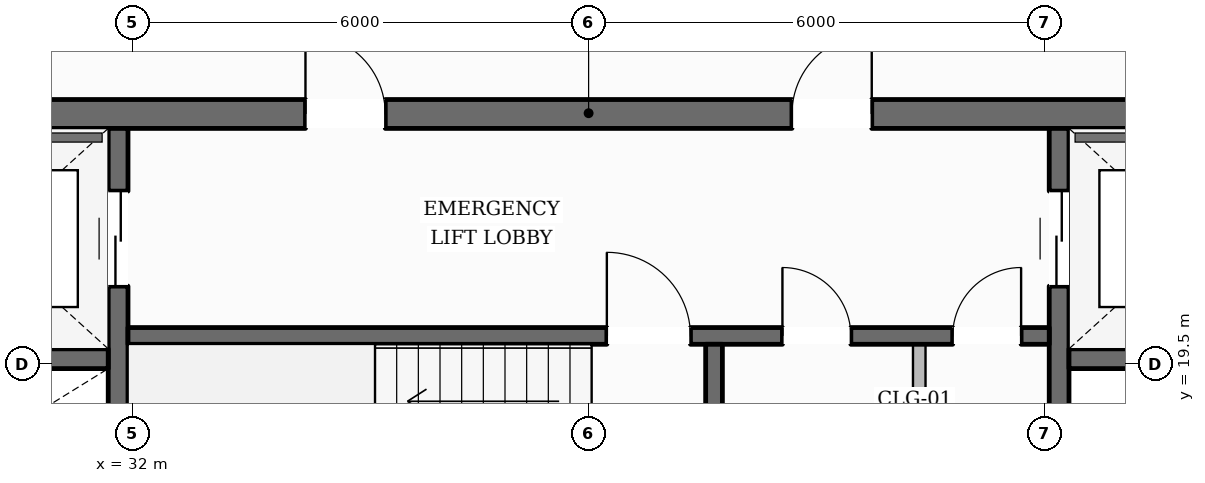
"""IFC4 building model, lengths in metres.
Left out: names, types, materials, properties, quantities, classifications, styles, units other than length and angle.
Written with IfcOpenShell. Run it as: python <this file> out.ifc"""

import sys

from ifc_helpers import new_model, si_unit, direction, frame, frame_2d, origin, place, context, subcontext, project, spatial, rectangle, extrude, element, fill, save


model = new_model("IFC4")
c1 = context("Model", 3, precision=1e-05, world=origin(), true_north=direction((0.0, 1.0)))
c2 = subcontext(c1, "Body", "Model", "MODEL_VIEW")
j1 = project(units=[si_unit("LENGTHUNIT", "METRE"), si_unit("PLANEANGLEUNIT", "RADIAN")], contexts=[c1])
p1 = place(None, origin())
s1 = spatial("IfcSite", under=j1, at=p1, CompositionType="ELEMENT")
p2 = place(p1, origin())
s2 = spatial("IfcBuilding", under=s1, at=p2, CompositionType="ELEMENT")
p3 = place(p2, frame((0.0, 0.0, 285.7)))
s3 = spatial("IfcBuildingStorey", under=s2, at=p3, CompositionType="ELEMENT", Elevation=285.7)
p4 = place(p3, frame((28.1, 22.79, 0.0), z_axis=(0.0, 0.0, 1.0), x_axis=(1.0, 0.0, 0.0)))
e1 = element("IfcWall", 1, at=p4, inside=s3, PredefinedType="SOLIDWALL", context=c2, shape_type="SweptSolid", body=[
    extrude(rectangle(XDim=19.8, YDim=0.38, at=frame_2d((9.9, 0.0))), origin(), (0.0, 0.0, 1.0), 3.61),
])
p5 = place(p4, frame((6.175, 0.0, 0.0)))
e2 = element("IfcOpeningElement", 2, at=p5, cuts=e1, PredefinedType="OPENING", context=c2, shape_type="SweptSolid", body=[
    extrude(rectangle(XDim=1.05, YDim=2.15, at=frame_2d((0.525, 1.075))), frame((0.0, 0.2, 0.0), z_axis=(0.0, -1.0, 0.0), x_axis=(1.0, 0.0, 0.0)), (0.0, 0.0, 1.0), 0.4),
])
p6 = place(p4, frame((12.575, 0.0, 0.0)))
e3 = element("IfcOpeningElement", 3, at=p6, cuts=e1, PredefinedType="OPENING", context=c2, shape_type="SweptSolid", body=[
    extrude(rectangle(XDim=1.05, YDim=2.15, at=frame_2d((0.525, 1.075))), frame((0.0, 0.2, 0.0), z_axis=(0.0, -1.0, 0.0), x_axis=(1.0, 0.0, 0.0)), (0.0, 0.0, 1.0), 0.4),
])
p7 = place(p3, frame((31.81, 9.6, 0.0), z_axis=(0.0, 0.0, 1.0), x_axis=(0.0, 1.0, 0.0)))
e4 = element("IfcWall", 4, at=p7, inside=s3, PredefinedType="SHEAR", context=c2, shape_type="SweptSolid", body=[
    extrude(rectangle(XDim=13.0, YDim=0.26, at=frame_2d((6.5, 0.0))), origin(), (0.0, 0.0, 1.0), 3.61),
])
p8 = place(p7, frame((10.925, 0.0, 0.0)))
e5 = element("IfcOpeningElement", 5, at=p8, cuts=e4, PredefinedType="OPENING", context=c2, shape_type="SweptSolid", body=[
    extrude(rectangle(XDim=1.25, YDim=2.25, at=frame_2d((0.625, 1.125))), frame((0.0, 0.14, 0.0), z_axis=(0.0, -1.0, 0.0), x_axis=(1.0, 0.0, 0.0)), (0.0, 0.0, 1.0), 0.28),
])
p9 = place(p3, frame((44.19, 9.6, 0.0), z_axis=(0.0, 0.0, 1.0), x_axis=(0.0, 1.0, 0.0)))
e6 = element("IfcWall", 6, at=p9, inside=s3, PredefinedType="SHEAR", context=c2, shape_type="SweptSolid", body=[
    extrude(rectangle(XDim=13.0, YDim=0.26, at=frame_2d((6.5, 0.0))), origin(), (0.0, 0.0, 1.0), 3.61),
])
p10 = place(p9, frame((10.925, 0.0, 0.0)))
e7 = element("IfcOpeningElement", 7, at=p10, cuts=e6, PredefinedType="OPENING", context=c2, shape_type="SweptSolid", body=[
    extrude(rectangle(XDim=1.25, YDim=2.25, at=frame_2d((0.625, 1.125))), frame((0.0, 0.14, 0.0), z_axis=(0.0, -1.0, 0.0), x_axis=(1.0, 0.0, 0.0)), (0.0, 0.0, 1.0), 0.28),
])
for number, where, z_axis, x_axis in (
    (8, (28.48, 19.57, 0.0), (0.0, 0.0, 1.0), (1.0, 0.0, 0.0)),
    (9, (44.32, 19.57, 0.0), (0.0, 0.0, 1.0), (1.0, 0.0, 0.0)),
):
    element("IfcWall", number, at=place(p3, frame(where, z_axis=z_axis, x_axis=x_axis)), inside=s3, PredefinedType="SHEAR", context=c2, shape_type="SweptSolid", body=[
        extrude(rectangle(XDim=3.2, YDim=0.26, at=frame_2d((1.6, 0.0))), origin(), (0.0, 0.0, 1.0), 3.61),
    ])
p11 = place(p3, frame((31.94, 19.87, 0.0), z_axis=(0.0, 0.0, 1.0), x_axis=(1.0, 0.0, 0.0)))
e10 = element("IfcWall", 10, at=p11, inside=s3, PredefinedType="SOLIDWALL", context=c2, shape_type="SweptSolid", body=[
    extrude(rectangle(XDim=12.12, YDim=0.22, at=frame_2d((6.06, 0.0))), origin(), (0.0, 0.0, 1.0), 3.61),
])
p12 = place(p11, frame((6.3, 0.0, 0.0)))
e11 = element("IfcOpeningElement", 11, at=p12, cuts=e10, PredefinedType="OPENING", context=c2, shape_type="SweptSolid", body=[
    extrude(rectangle(XDim=1.1, YDim=2.15, at=frame_2d((0.55, 1.075))), frame((0.0, 0.12, 0.0), z_axis=(0.0, -1.0, 0.0), x_axis=(1.0, 0.0, 0.0)), (0.0, 0.0, 1.0), 0.24),
])
p13 = place(p11, frame((8.61, 0.0, 0.0)))
e12 = element("IfcOpeningElement", 12, at=p13, cuts=e10, PredefinedType="OPENING", context=c2, shape_type="SweptSolid", body=[
    extrude(rectangle(XDim=0.9, YDim=2.1, at=frame_2d((0.45, 1.05))), frame((0.0, 0.12, 0.0), z_axis=(0.0, -1.0, 0.0), x_axis=(1.0, 0.0, 0.0)), (0.0, 0.0, 1.0), 0.24),
])
p14 = place(p11, frame((10.85, 0.0, 0.0)))
e13 = element("IfcOpeningElement", 13, at=p14, cuts=e10, PredefinedType="OPENING", context=c2, shape_type="SweptSolid", body=[
    extrude(rectangle(XDim=0.9, YDim=2.1, at=frame_2d((0.45, 1.05))), frame((0.0, 0.12, 0.0), z_axis=(0.0, -1.0, 0.0), x_axis=(1.0, 0.0, 0.0)), (0.0, 0.0, 1.0), 0.24),
])
p15 = place(p3, frame((39.65, 16.56, 0.0), z_axis=(0.0, 0.0, 1.0), x_axis=(0.0, 1.0, 0.0)))
e14 = element("IfcWall", 14, at=p15, inside=s3, PredefinedType="SOLIDWALL", context=c2, shape_type="SweptSolid", body=[
    extrude(rectangle(XDim=3.2, YDim=0.22, at=frame_2d((1.6, 0.0))), origin(), (0.0, 0.0, 1.0), 3.61),
])
p16 = place(p3, frame((15.195, 10.019, 0.0), z_axis=(0.0, 0.0, 1.0), x_axis=(0.508088294866, 0.861304989316, 0.0)))
e15 = element("IfcWall", 15, at=p16, inside=s3, PredefinedType="STANDARD", context=c2, shape_type="SweptSolid", body=[
    extrude(rectangle(XDim=39.26, YDim=0.35, at=frame_2d((19.63, 0.0))), origin(), (0.0, 0.0, 1.0), 3.196),
])
p17 = place(p16, frame((28.845, 0.0, 0.0)))
e16 = element("IfcOpeningElement", 16, at=p17, cuts=e15, PredefinedType="OPENING", context=c2, shape_type="SweptSolid", body=[
    extrude(rectangle(XDim=1.0, YDim=2.2, at=frame_2d((0.5, 1.1))), frame((0.0, 0.185, 0.0), z_axis=(0.0, -1.0, 0.0), x_axis=(1.0, 0.0, 0.0)), (0.0, 0.0, 1.0), 0.37),
])
p18 = place(p16, frame((34.922, 0.0, 0.65)))
e17 = element("IfcOpeningElement", 17, at=p18, cuts=e15, PredefinedType="OPENING", context=c2, shape_type="SweptSolid", body=[
    extrude(rectangle(XDim=1.35, YDim=1.75, at=frame_2d((0.675, 0.875))), frame((0.0, 0.185, 0.0), z_axis=(0.0, -1.0, 0.0), x_axis=(1.0, 0.0, 0.0)), (0.0, 0.0, 1.0), 0.37),
])
p19 = place(p16, frame((22.152, 0.0, 0.65)))
e18 = element("IfcOpeningElement", 18, at=p19, cuts=e15, PredefinedType="OPENING", context=c2, shape_type="SweptSolid", body=[
    extrude(rectangle(XDim=1.35, YDim=1.75, at=frame_2d((0.675, 0.875))), frame((0.0, 0.185, 0.0), z_axis=(0.0, -1.0, 0.0), x_axis=(1.0, 0.0, 0.0)), (0.0, 0.0, 1.0), 0.37),
])
p20 = place(p16, frame((9.382, 0.0, 0.65)))
e19 = element("IfcOpeningElement", 19, at=p20, cuts=e15, PredefinedType="OPENING", context=c2, shape_type="SweptSolid", body=[
    extrude(rectangle(XDim=1.35, YDim=1.75, at=frame_2d((0.675, 0.875))), frame((0.0, 0.185, 0.0), z_axis=(0.0, -1.0, 0.0), x_axis=(1.0, 0.0, 0.0)), (0.0, 0.0, 1.0), 0.37),
])
p21 = place(p16, frame((2.997, 0.0, 0.65)))
e20 = element("IfcOpeningElement", 20, at=p21, cuts=e15, PredefinedType="OPENING", context=c2, shape_type="SweptSolid", body=[
    extrude(rectangle(XDim=1.35, YDim=1.75, at=frame_2d((0.675, 0.875))), frame((0.0, 0.185, 0.0), z_axis=(0.0, -1.0, 0.0), x_axis=(1.0, 0.0, 0.0)), (0.0, 0.0, 1.0), 0.37),
])
p22 = place(p3, frame((40.742, 43.905, 0.0), z_axis=(0.0, 0.0, 1.0), x_axis=(0.49863744838, -0.866810645454, 0.0)))
e21 = element("IfcWall", 21, at=p22, inside=s3, PredefinedType="STANDARD", context=c2, shape_type="SweptSolid", body=[
    extrude(rectangle(XDim=38.525, YDim=0.35, at=frame_2d((19.262, 0.0))), origin(), (0.0, 0.0, 1.0), 3.196),
])
p23 = place(p22, frame((34.24, 0.0, 0.65)))
e22 = element("IfcOpeningElement", 22, at=p23, cuts=e21, PredefinedType="OPENING", context=c2, shape_type="SweptSolid", body=[
    extrude(rectangle(XDim=1.35, YDim=1.75, at=frame_2d((0.675, 0.875))), frame((0.0, 0.185, 0.0), z_axis=(0.0, -1.0, 0.0), x_axis=(1.0, 0.0, 0.0)), (0.0, 0.0, 1.0), 0.37),
])
p24 = place(p22, frame((27.979, 0.0, 0.65)))
e23 = element("IfcOpeningElement", 23, at=p24, cuts=e21, PredefinedType="OPENING", context=c2, shape_type="SweptSolid", body=[
    extrude(rectangle(XDim=1.35, YDim=1.75, at=frame_2d((0.675, 0.875))), frame((0.0, 0.185, 0.0), z_axis=(0.0, -1.0, 0.0), x_axis=(1.0, 0.0, 0.0)), (0.0, 0.0, 1.0), 0.37),
])
p25 = place(p22, frame((21.719, 0.0, 0.65)))
e24 = element("IfcOpeningElement", 24, at=p25, cuts=e21, PredefinedType="OPENING", context=c2, shape_type="SweptSolid", body=[
    extrude(rectangle(XDim=1.35, YDim=1.75, at=frame_2d((0.675, 0.875))), frame((0.0, 0.185, 0.0), z_axis=(0.0, -1.0, 0.0), x_axis=(1.0, 0.0, 0.0)), (0.0, 0.0, 1.0), 0.37),
])
p26 = place(p22, frame((9.197, 0.0, 0.65)))
e25 = element("IfcOpeningElement", 25, at=p26, cuts=e21, PredefinedType="OPENING", context=c2, shape_type="SweptSolid", body=[
    extrude(rectangle(XDim=1.35, YDim=1.75, at=frame_2d((0.675, 0.875))), frame((0.0, 0.185, 0.0), z_axis=(0.0, -1.0, 0.0), x_axis=(1.0, 0.0, 0.0)), (0.0, 0.0, 1.0), 0.37),
])
p27 = place(p22, frame((2.936, 0.0, 0.65)))
e26 = element("IfcOpeningElement", 26, at=p27, cuts=e21, PredefinedType="OPENING", context=c2, shape_type="SweptSolid", body=[
    extrude(rectangle(XDim=1.35, YDim=1.75, at=frame_2d((0.675, 0.875))), frame((0.0, 0.185, 0.0), z_axis=(0.0, -1.0, 0.0), x_axis=(1.0, 0.0, 0.0)), (0.0, 0.0, 1.0), 0.37),
])
p28 = place(p3, frame((42.35, 16.56, 0.0), z_axis=(0.0, 0.0, 1.0), x_axis=(0.0, 1.0, 0.0)))
e27 = element("IfcWall", 27, at=p28, inside=s3, PredefinedType="PARTITIONING", context=c2, shape_type="SweptSolid", body=[
    extrude(rectangle(XDim=3.2, YDim=0.165, at=frame_2d((1.6, 0.0))), origin(), (0.0, 0.0, 1.0), 3.61),
])
p29 = place(p12, origin())
e28 = element("IfcDoor", 28, at=p29, inside=s3, OperationType="SINGLE_SWING_LEFT", PredefinedType="DOOR", context=c2, shape_type="SweptSolid", body=[
    extrude(rectangle(XDim=1.1, YDim=2.15, at=frame_2d((0.55, 1.075))), frame((0.0, 0.025, 0.0), z_axis=(0.0, -1.0, 0.0), x_axis=(1.0, 0.0, 0.0)), (0.0, 0.0, 1.0), 0.05),
])
fill(e11, e28)
p30 = place(p5, origin())
e29 = element("IfcDoor", 29, at=p30, inside=s3, OperationType="SINGLE_SWING_LEFT", PredefinedType="DOOR", context=c2, shape_type="SweptSolid", body=[
    extrude(rectangle(XDim=1.05, YDim=2.15, at=frame_2d((0.525, 1.075))), frame((0.0, 0.025, 0.0), z_axis=(0.0, -1.0, 0.0), x_axis=(1.0, 0.0, 0.0)), (0.0, 0.0, 1.0), 0.05),
])
fill(e2, e29)
p31 = place(p6, origin())
e30 = element("IfcDoor", 30, at=p31, inside=s3, OperationType="SINGLE_SWING_RIGHT", PredefinedType="DOOR", context=c2, shape_type="SweptSolid", body=[
    extrude(rectangle(XDim=1.05, YDim=2.15, at=frame_2d((0.525, 1.075))), frame((0.0, 0.025, 0.0), z_axis=(0.0, -1.0, 0.0), x_axis=(1.0, 0.0, 0.0)), (0.0, 0.0, 1.0), 0.05),
])
fill(e3, e30)
p32 = place(p8, origin())
e31 = element("IfcDoor", 31, at=p32, inside=s3, OperationType="DOUBLE_DOOR_SLIDING", PredefinedType="DOOR", context=c2, shape_type="SweptSolid", body=[
    extrude(rectangle(XDim=1.25, YDim=2.25, at=frame_2d((0.625, 1.125))), frame((0.0, 0.025, 0.0), z_axis=(0.0, -1.0, 0.0), x_axis=(1.0, 0.0, 0.0)), (0.0, 0.0, 1.0), 0.05),
])
fill(e5, e31)
p33 = place(p10, origin())
e32 = element("IfcDoor", 32, at=p33, inside=s3, OperationType="DOUBLE_DOOR_SLIDING", PredefinedType="DOOR", context=c2, shape_type="SweptSolid", body=[
    extrude(rectangle(XDim=1.25, YDim=2.25, at=frame_2d((0.625, 1.125))), frame((0.0, 0.025, 0.0), z_axis=(0.0, -1.0, 0.0), x_axis=(1.0, 0.0, 0.0)), (0.0, 0.0, 1.0), 0.05),
])
fill(e7, e32)
p34 = place(p13, origin())
e33 = element("IfcDoor", 33, at=p34, inside=s3, OperationType="SINGLE_SWING_LEFT", PredefinedType="DOOR", context=c2, shape_type="SweptSolid", body=[
    extrude(rectangle(XDim=0.9, YDim=2.1, at=frame_2d((0.45, 1.05))), frame((0.0, 0.025, 0.0), z_axis=(0.0, -1.0, 0.0), x_axis=(1.0, 0.0, 0.0)), (0.0, 0.0, 1.0), 0.05),
])
fill(e12, e33)
p35 = place(p14, origin())
e34 = element("IfcDoor", 34, at=p35, inside=s3, OperationType="SINGLE_SWING_RIGHT", PredefinedType="DOOR", context=c2, shape_type="SweptSolid", body=[
    extrude(rectangle(XDim=0.9, YDim=2.1, at=frame_2d((0.45, 1.05))), frame((0.0, 0.025, 0.0), z_axis=(0.0, -1.0, 0.0), x_axis=(1.0, 0.0, 0.0)), (0.0, 0.0, 1.0), 0.05),
])
fill(e13, e34)
save(model, sys.argv[1])
